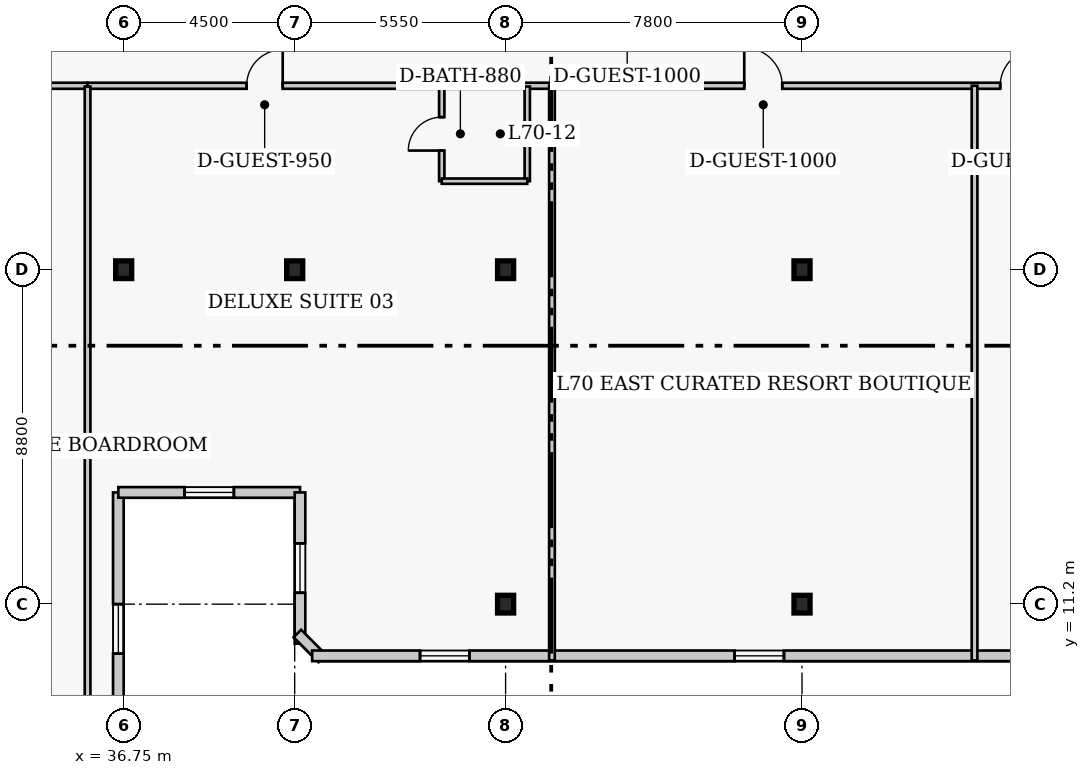
"""IFC4 building model, lengths in metres.
Left out: names, types, materials, properties, quantities, classifications, styles, units other than length and angle.
Written with IfcOpenShell. Run it as: python <this file> out.ifc"""

import sys

from ifc_helpers import new_model, si_unit, direction, frame, frame_2d, origin, origin_2d, place, context, subcontext, project, spatial, rectangle, i_section, extrude, element, fill, save


model = new_model("IFC4")
c1 = context("Model", 3, precision=1e-05, world=origin(), true_north=direction((0.0, 1.0)))
c2 = subcontext(c1, "Body", "Model", "MODEL_VIEW")
j1 = project(units=[si_unit("LENGTHUNIT", "METRE"), si_unit("PLANEANGLEUNIT", "RADIAN")], contexts=[c1])
p1 = place(None, origin())
s1 = spatial("IfcSite", under=j1, at=p1, CompositionType="ELEMENT")
p2 = place(p1, origin())
s2 = spatial("IfcBuilding", under=s1, at=p2, CompositionType="ELEMENT")
p3 = place(p2, frame((0.0, 0.0, 281.4)))
s3 = spatial("IfcBuildingStorey", under=s2, at=p3, CompositionType="ELEMENT", Elevation=281.4)
for number, where, z_axis, x_axis in (
    (1, (36.75, 20.0, 0.0), (0.0, 0.0, 1.0), (1.0, 0.0, 0.0)),
    (2, (41.25, 20.0, 0.0), (0.0, 0.0, 1.0), (1.0, 0.0, 0.0)),
    (3, (46.8, 11.2, 0.0), (0.0, 0.0, 1.0), (1.0, 0.0, 0.0)),
    (4, (46.8, 20.0, 0.0), (0.0, 0.0, 1.0), (1.0, 0.0, 0.0)),
    (5, (54.6, 11.2, 0.0), (0.0, 0.0, 1.0), (1.0, 0.0, 0.0)),
    (6, (54.6, 20.0, 0.0), (0.0, 0.0, 1.0), (1.0, 0.0, 0.0)),
):
    element("IfcColumn", number, at=place(p3, frame(where, z_axis=z_axis, x_axis=x_axis)), inside=s3, PredefinedType="COLUMN", context=c2, shape_type="SweptSolid", body=[
        extrude(i_section(OverallWidth=0.422, OverallDepth=0.465, WebThickness=0.045, FlangeThickness=0.073, FilletRadius=0.017, at=origin_2d()), origin(), (0.0, 0.0, 1.0), 4.0),
    ])
p4 = place(p3, frame((36.61, 6.96, 0.0), z_axis=(0.0, 0.0, 1.0), x_axis=(0.0, 1.0, 0.0)))
e7 = element("IfcWall", 7, at=p4, inside=s3, PredefinedType="SOLIDWALL", context=c2, shape_type="SweptSolid", body=[
    extrude(rectangle(XDim=7.18, YDim=0.28, at=frame_2d((3.59, 0.0))), origin(), (0.0, 0.0, 1.0), 3.76),
])
p5 = place(p4, frame((2.94, 0.0, 0.85)))
e8 = element("IfcOpeningElement", 8, at=p5, cuts=e7, PredefinedType="OPENING", context=c2, shape_type="SweptSolid", body=[
    extrude(rectangle(XDim=1.3, YDim=1.7, at=frame_2d((0.65, 0.85))), frame((0.0, 0.15, 0.0), z_axis=(0.0, -1.0, 0.0), x_axis=(1.0, 0.0, 0.0)), (0.0, 0.0, 1.0), 0.3),
])
p6 = place(p3, frame((36.61, 14.14, 0.0), z_axis=(0.0, 0.0, 1.0), x_axis=(1.0, 0.0, 0.0)))
e9 = element("IfcWall", 9, at=p6, inside=s3, PredefinedType="SOLIDWALL", context=c2, shape_type="SweptSolid", body=[
    extrude(rectangle(XDim=4.78, YDim=0.28, at=frame_2d((2.39, 0.0))), origin(), (0.0, 0.0, 1.0), 3.76),
])
p7 = place(p6, frame((1.74, 0.0, 0.85)))
e10 = element("IfcOpeningElement", 10, at=p7, cuts=e9, PredefinedType="OPENING", context=c2, shape_type="SweptSolid", body=[
    extrude(rectangle(XDim=1.3, YDim=1.7, at=frame_2d((0.65, 0.85))), frame((0.0, 0.15, 0.0), z_axis=(0.0, -1.0, 0.0), x_axis=(1.0, 0.0, 0.0)), (0.0, 0.0, 1.0), 0.3),
])
p8 = place(p3, frame((41.39, 14.14, 0.0), z_axis=(0.0, 0.0, 1.0), x_axis=(0.0, -1.0, 0.0)))
e11 = element("IfcWall", 11, at=p8, inside=s3, PredefinedType="SOLIDWALL", context=c2, shape_type="SweptSolid", body=[
    extrude(rectangle(XDim=3.98, YDim=0.28, at=frame_2d((1.99, 0.0))), origin(), (0.0, 0.0, 1.0), 3.76),
])
p9 = place(p8, frame((1.34, 0.0, 0.85)))
e12 = element("IfcOpeningElement", 12, at=p9, cuts=e11, PredefinedType="OPENING", context=c2, shape_type="SweptSolid", body=[
    extrude(rectangle(XDim=1.3, YDim=1.7, at=frame_2d((0.65, 0.85))), frame((0.0, 0.15, 0.0), z_axis=(0.0, -1.0, 0.0), x_axis=(1.0, 0.0, 0.0)), (0.0, 0.0, 1.0), 0.3),
])
p10 = place(p3, frame((41.321, 10.427, 0.0), z_axis=(0.0, 0.0, 1.0), x_axis=(0.707106781187, -0.707106781187, 0.0)))
e13 = element("IfcWall", 13, at=p10, inside=s3, PredefinedType="SOLIDWALL", context=c2, shape_type="SweptSolid", body=[
    extrude(rectangle(XDim=0.928, YDim=0.28, at=frame_2d((0.464, 0.0))), origin(), (0.0, 0.0, 1.0), 3.76),
])
p11 = place(p3, frame((41.71, 9.84, 0.0), z_axis=(0.0, 0.0, 1.0), x_axis=(1.0, 0.0, 0.0)))
e14 = element("IfcWall", 14, at=p11, inside=s3, PredefinedType="SOLIDWALL", context=c2, shape_type="SweptSolid", body=[
    extrude(rectangle(XDim=24.83, YDim=0.28, at=frame_2d((12.415, 0.0))), origin(), (0.0, 0.0, 1.0), 3.76),
])
p12 = place(p11, frame((2.838, 0.0, 0.85)))
e15 = element("IfcOpeningElement", 15, at=p12, cuts=e14, PredefinedType="OPENING", context=c2, shape_type="SweptSolid", body=[
    extrude(rectangle(XDim=1.3, YDim=1.7, at=frame_2d((0.65, 0.85))), frame((0.0, 0.15, 0.0), z_axis=(0.0, -1.0, 0.0), x_axis=(1.0, 0.0, 0.0)), (0.0, 0.0, 1.0), 0.3),
])
p13 = place(p11, frame((11.115, 0.0, 0.85)))
e16 = element("IfcOpeningElement", 16, at=p13, cuts=e14, PredefinedType="OPENING", context=c2, shape_type="SweptSolid", body=[
    extrude(rectangle(XDim=1.3, YDim=1.7, at=frame_2d((0.65, 0.85))), frame((0.0, 0.15, 0.0), z_axis=(0.0, -1.0, 0.0), x_axis=(1.0, 0.0, 0.0)), (0.0, 0.0, 1.0), 0.3),
])
p14 = place(p11, frame((18.892, 0.0, 0.85)))
e17 = element("IfcOpeningElement", 17, at=p14, cuts=e14, PredefinedType="OPENING", context=c2, shape_type="SweptSolid", body=[
    extrude(rectangle(XDim=1.3, YDim=1.7, at=frame_2d((0.65, 0.85))), frame((0.0, 0.15, 0.0), z_axis=(0.0, -1.0, 0.0), x_axis=(1.0, 0.0, 0.0)), (0.0, 0.0, 1.0), 0.3),
])
p15 = place(p3, frame((18.8, 24.84, 0.0), z_axis=(0.0, 0.0, 1.0), x_axis=(1.0, 0.0, 0.0)))
e18 = element("IfcWall", 18, at=p15, inside=s3, PredefinedType="PARTITIONING", context=c2, shape_type="SweptSolid", body=[
    extrude(rectangle(XDim=17.0, YDim=0.16, at=frame_2d((8.5, 0.0))), origin(), (0.0, 0.0, 1.0), 3.76),
])
p16 = place(p15, frame((3.265, 0.0, 0.0)))
e19 = element("IfcOpeningElement", 19, at=p16, cuts=e18, PredefinedType="OPENING", context=c2, shape_type="SweptSolid", body=[
    extrude(rectangle(XDim=0.95, YDim=2.1, at=frame_2d((0.475, 1.05))), frame((0.0, 0.09, 0.0), z_axis=(0.0, -1.0, 0.0), x_axis=(1.0, 0.0, 0.0)), (0.0, 0.0, 1.0), 0.18),
])
p17 = place(p15, frame((6.052, 0.0, 0.0)))
e20 = element("IfcOpeningElement", 20, at=p17, cuts=e18, PredefinedType="OPENING", context=c2, shape_type="SweptSolid", body=[
    extrude(rectangle(XDim=0.95, YDim=2.1, at=frame_2d((0.475, 1.05))), frame((0.0, 0.09, 0.0), z_axis=(0.0, -1.0, 0.0), x_axis=(1.0, 0.0, 0.0)), (0.0, 0.0, 1.0), 0.18),
])
p18 = place(p15, frame((13.127, 0.0, 0.0)))
e21 = element("IfcOpeningElement", 21, at=p18, cuts=e18, PredefinedType="OPENING", context=c2, shape_type="SweptSolid", body=[
    extrude(rectangle(XDim=1.0, YDim=2.15, at=frame_2d((0.5, 1.075))), frame((0.0, 0.09, 0.0), z_axis=(0.0, -1.0, 0.0), x_axis=(1.0, 0.0, 0.0)), (0.0, 0.0, 1.0), 0.18),
])
p19 = place(p3, frame((35.8, 24.84, 0.0), z_axis=(0.0, 0.0, 1.0), x_axis=(1.0, 0.0, 0.0)))
e22 = element("IfcWall", 22, at=p19, inside=s3, PredefinedType="PARTITIONING", context=c2, shape_type="SweptSolid", body=[
    extrude(rectangle(XDim=25.56, YDim=0.16, at=frame_2d((12.78, 0.0))), origin(), (0.0, 0.0, 1.0), 3.76),
])
p20 = place(p19, frame((4.185, 0.0, 0.0)))
e23 = element("IfcOpeningElement", 23, at=p20, cuts=e22, PredefinedType="OPENING", context=c2, shape_type="SweptSolid", body=[
    extrude(rectangle(XDim=0.95, YDim=2.1, at=frame_2d((0.475, 1.05))), frame((0.0, 0.09, 0.0), z_axis=(0.0, -1.0, 0.0), x_axis=(1.0, 0.0, 0.0)), (0.0, 0.0, 1.0), 0.18),
])
p21 = place(p19, frame((17.28, 0.0, 0.0)))
e24 = element("IfcOpeningElement", 24, at=p21, cuts=e22, PredefinedType="OPENING", context=c2, shape_type="SweptSolid", body=[
    extrude(rectangle(XDim=1.0, YDim=2.15, at=frame_2d((0.5, 1.075))), frame((0.0, 0.09, 0.0), z_axis=(0.0, -1.0, 0.0), x_axis=(1.0, 0.0, 0.0)), (0.0, 0.0, 1.0), 0.18),
])
p22 = place(p19, frame((24.015, 0.0, 0.0)))
e25 = element("IfcOpeningElement", 25, at=p22, cuts=e22, PredefinedType="OPENING", context=c2, shape_type="SweptSolid", body=[
    extrude(rectangle(XDim=0.95, YDim=2.1, at=frame_2d((0.475, 1.05))), frame((0.0, 0.09, 0.0), z_axis=(0.0, -1.0, 0.0), x_axis=(1.0, 0.0, 0.0)), (0.0, 0.0, 1.0), 0.18),
])
p23 = place(p3, frame((35.8, 6.52, 0.0), z_axis=(0.0, 0.0, 1.0), x_axis=(0.0, 1.0, 0.0)))
e26 = element("IfcWall", 26, at=p23, inside=s3, PredefinedType="PARTITIONING", context=c2, shape_type="SweptSolid", body=[
    extrude(rectangle(XDim=18.3, YDim=0.15, at=frame_2d((9.15, 0.0))), origin(), (0.0, 0.0, 1.0), 3.76),
])
p24 = place(p3, frame((45.12, 22.33, 0.0), z_axis=(0.0, 0.0, 1.0), x_axis=(0.0, 1.0, 0.0)))
e27 = element("IfcWall", 27, at=p24, inside=s3, PredefinedType="PLUMBINGWALL", context=c2, shape_type="SweptSolid", body=[
    extrude(rectangle(XDim=2.49, YDim=0.14, at=frame_2d((1.245, 0.0))), origin(), (0.0, 0.0, 1.0), 3.76),
])
p25 = place(p24, frame((0.805, 0.0, 0.0)))
e28 = element("IfcOpeningElement", 28, at=p25, cuts=e27, PredefinedType="OPENING", context=c2, shape_type="SweptSolid", body=[
    extrude(rectangle(XDim=0.88, YDim=2.05, at=frame_2d((0.44, 1.025))), frame((0.0, 0.08, 0.0), z_axis=(0.0, -1.0, 0.0), x_axis=(1.0, 0.0, 0.0)), (0.0, 0.0, 1.0), 0.16),
])
p26 = place(p3, frame((47.37, 22.33, 0.0), z_axis=(0.0, 0.0, 1.0), x_axis=(0.0, 1.0, 0.0)))
e29 = element("IfcWall", 29, at=p26, inside=s3, PredefinedType="PLUMBINGWALL", context=c2, shape_type="SweptSolid", body=[
    extrude(rectangle(XDim=2.49, YDim=0.14, at=frame_2d((1.245, 0.0))), origin(), (0.0, 0.0, 1.0), 3.76),
])
p27 = place(p3, frame((45.12, 22.33, 0.0), z_axis=(0.0, 0.0, 1.0), x_axis=(1.0, 0.0, 0.0)))
e30 = element("IfcWall", 30, at=p27, inside=s3, PredefinedType="PLUMBINGWALL", context=c2, shape_type="SweptSolid", body=[
    extrude(rectangle(XDim=2.25, YDim=0.14, at=frame_2d((1.125, 0.0))), origin(), (0.0, 0.0, 1.0), 3.76),
])
for number, where, z_axis, x_axis in (
    (31, (48.02, 9.72, 0.0), (0.0, 0.0, 1.0), (0.0, 1.0, 0.0)),
    (32, (59.14, 9.72, 0.0), (0.0, 0.0, 1.0), (0.0, 1.0, 0.0)),
):
    element("IfcWall", number, at=place(p3, frame(where, z_axis=z_axis, x_axis=x_axis)), inside=s3, PredefinedType="PARTITIONING", context=c2, shape_type="SweptSolid", body=[
        extrude(rectangle(XDim=15.12, YDim=0.15, at=frame_2d((7.56, 0.0))), origin(), (0.0, 0.0, 1.0), 3.76),
    ])
p28 = place(p5, origin())
e33 = element("IfcWindow", 33, at=p28, inside=s3, PartitioningType="SINGLE_PANEL", PredefinedType="WINDOW", context=c2, shape_type="SweptSolid", body=[
    extrude(rectangle(XDim=1.3, YDim=1.7, at=frame_2d((0.65, 0.85))), frame((0.0, 0.03, 0.0), z_axis=(0.0, -1.0, 0.0), x_axis=(1.0, 0.0, 0.0)), (0.0, 0.0, 1.0), 0.06),
])
fill(e8, e33)
p29 = place(p7, origin())
e34 = element("IfcWindow", 34, at=p29, inside=s3, PartitioningType="SINGLE_PANEL", PredefinedType="WINDOW", context=c2, shape_type="SweptSolid", body=[
    extrude(rectangle(XDim=1.3, YDim=1.7, at=frame_2d((0.65, 0.85))), frame((0.0, 0.03, 0.0), z_axis=(0.0, -1.0, 0.0), x_axis=(1.0, 0.0, 0.0)), (0.0, 0.0, 1.0), 0.06),
])
fill(e10, e34)
p30 = place(p9, origin())
e35 = element("IfcWindow", 35, at=p30, inside=s3, PartitioningType="SINGLE_PANEL", PredefinedType="WINDOW", context=c2, shape_type="SweptSolid", body=[
    extrude(rectangle(XDim=1.3, YDim=1.7, at=frame_2d((0.65, 0.85))), frame((0.0, 0.03, 0.0), z_axis=(0.0, -1.0, 0.0), x_axis=(1.0, 0.0, 0.0)), (0.0, 0.0, 1.0), 0.06),
])
fill(e12, e35)
p31 = place(p12, origin())
e36 = element("IfcWindow", 36, at=p31, inside=s3, PartitioningType="SINGLE_PANEL", PredefinedType="WINDOW", context=c2, shape_type="SweptSolid", body=[
    extrude(rectangle(XDim=1.3, YDim=1.7, at=frame_2d((0.65, 0.85))), frame((0.0, 0.03, 0.0), z_axis=(0.0, -1.0, 0.0), x_axis=(1.0, 0.0, 0.0)), (0.0, 0.0, 1.0), 0.06),
])
fill(e15, e36)
p32 = place(p13, origin())
e37 = element("IfcWindow", 37, at=p32, inside=s3, PartitioningType="SINGLE_PANEL", PredefinedType="WINDOW", context=c2, shape_type="SweptSolid", body=[
    extrude(rectangle(XDim=1.3, YDim=1.7, at=frame_2d((0.65, 0.85))), frame((0.0, 0.03, 0.0), z_axis=(0.0, -1.0, 0.0), x_axis=(1.0, 0.0, 0.0)), (0.0, 0.0, 1.0), 0.06),
])
fill(e16, e37)
p33 = place(p25, origin())
e38 = element("IfcDoor", 38, at=p33, inside=s3, OperationType="SINGLE_SWING_LEFT", PredefinedType="DOOR", context=c2, shape_type="SweptSolid", body=[
    extrude(rectangle(XDim=0.88, YDim=2.05, at=frame_2d((0.44, 1.025))), frame((0.0, 0.025, 0.0), z_axis=(0.0, -1.0, 0.0), x_axis=(1.0, 0.0, 0.0)), (0.0, 0.0, 1.0), 0.05),
])
fill(e28, e38)
p34 = place(p20, origin())
e39 = element("IfcDoor", 39, at=p34, inside=s3, OperationType="SINGLE_SWING_RIGHT", PredefinedType="DOOR", context=c2, shape_type="SweptSolid", body=[
    extrude(rectangle(XDim=0.95, YDim=2.1, at=frame_2d((0.475, 1.05))), frame((0.0, 0.025, 0.0), z_axis=(0.0, -1.0, 0.0), x_axis=(1.0, 0.0, 0.0)), (0.0, 0.0, 1.0), 0.05),
])
fill(e23, e39)
p35 = place(p21, origin())
e40 = element("IfcDoor", 40, at=p35, inside=s3, OperationType="SINGLE_SWING_LEFT", PredefinedType="DOOR", context=c2, shape_type="SweptSolid", body=[
    extrude(rectangle(XDim=1.0, YDim=2.15, at=frame_2d((0.5, 1.075))), frame((0.0, 0.025, 0.0), z_axis=(0.0, -1.0, 0.0), x_axis=(1.0, 0.0, 0.0)), (0.0, 0.0, 1.0), 0.05),
])
fill(e24, e40)
p36 = place(p22, origin())
e41 = element("IfcDoor", 41, at=p36, inside=s3, OperationType="SINGLE_SWING_RIGHT", PredefinedType="DOOR", context=c2, shape_type="SweptSolid", body=[
    extrude(rectangle(XDim=0.95, YDim=2.1, at=frame_2d((0.475, 1.05))), frame((0.0, 0.025, 0.0), z_axis=(0.0, -1.0, 0.0), x_axis=(1.0, 0.0, 0.0)), (0.0, 0.0, 1.0), 0.05),
])
fill(e25, e41)
save(model, sys.argv[1])
